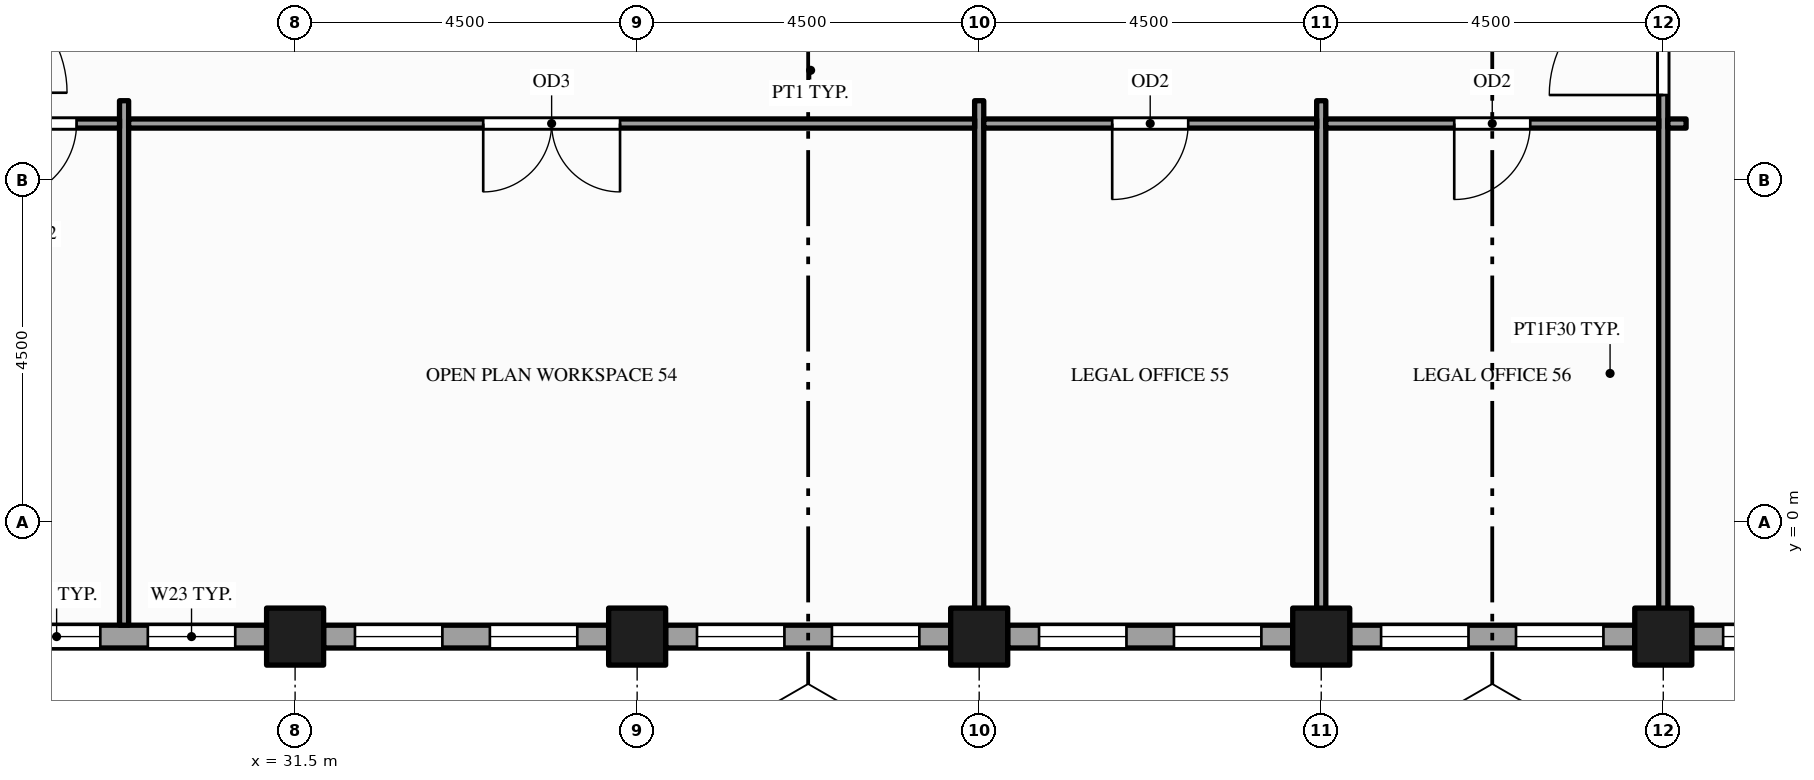
"""IFC4 building model, lengths in metres.
Left out: names, types, materials, properties, quantities, classifications, styles, units other than length and angle.
Written with IfcOpenShell. Run it as: python <this file> out.ifc"""

import sys

from ifc_helpers import new_model, si_unit, direction, frame, frame_2d, origin, origin_2d, place, context, subcontext, project, spatial, rectangle, hollow_rectangle, extrude, element, fill, save


model = new_model("IFC4")
c1 = context("Model", 3, precision=1e-05, world=origin(), true_north=direction((0.0, 1.0)))
c2 = subcontext(c1, "Body", "Model", "MODEL_VIEW")
j1 = project(units=[si_unit("LENGTHUNIT", "METRE"), si_unit("PLANEANGLEUNIT", "RADIAN")], contexts=[c1])
p1 = place(None, origin())
s1 = spatial("IfcSite", under=j1, at=p1, CompositionType="ELEMENT")
p2 = place(p1, origin())
s2 = spatial("IfcBuilding", under=s1, at=p2, CompositionType="ELEMENT")
p3 = place(p2, frame((0.0, 0.0, 235.0)))
s3 = spatial("IfcBuildingStorey", under=s2, at=p3, CompositionType="ELEMENT", Elevation=235.0)
for number, where, z_axis, x_axis in (
    (1, (31.5, -1.5, -0.15), (0.0, 0.0, 1.0), (1.0, 0.0, 0.0)),
    (2, (36.0, -1.5, -0.15), (0.0, 0.0, 1.0), (1.0, 0.0, 0.0)),
    (3, (40.5, -1.5, -0.15), (0.0, 0.0, 1.0), (1.0, 0.0, 0.0)),
    (4, (45.0, -1.5, -0.15), (0.0, 0.0, 1.0), (1.0, 0.0, 0.0)),
    (5, (49.5, -1.5, -0.15), (0.0, 0.0, 1.0), (1.0, 0.0, 0.0)),
):
    element("IfcColumn", number, at=place(p3, frame(where, z_axis=z_axis, x_axis=x_axis)), inside=s3, PredefinedType="COLUMN", context=c2, shape_type="SweptSolid", body=[
        extrude(hollow_rectangle(XDim=0.75, YDim=0.75, WallThickness=0.036, at=origin_2d()), origin(), (0.0, 0.0, 1.0), 4.0),
    ])
p4 = place(p3, frame((27.375, -1.5, 0.0), z_axis=(0.0, 0.0, 1.0), x_axis=(1.0, 0.0, 0.0)))
e6 = element("IfcWall", 6, at=p4, inside=s3, PredefinedType="STANDARD", context=c2, shape_type="SweptSolid", body=[
    extrude(rectangle(XDim=3.75, YDim=0.3, at=frame_2d((1.875, 0.0))), origin(), (0.0, 0.0, 1.0), 2.87),
])
p5 = place(p4, frame((0.413, 0.0, 0.9)))
e7 = element("IfcOpeningElement", 7, at=p5, cuts=e6, PredefinedType="OPENING", context=c2, shape_type="SweptSolid", body=[
    extrude(rectangle(XDim=1.15, YDim=1.75, at=frame_2d((0.575, 0.875))), frame((0.0, 0.16, 0.0), z_axis=(0.0, -1.0, 0.0), x_axis=(1.0, 0.0, 0.0)), (0.0, 0.0, 1.0), 0.32),
])
p6 = place(p4, frame((2.188, 0.0, 0.9)))
e8 = element("IfcOpeningElement", 8, at=p6, cuts=e6, PredefinedType="OPENING", context=c2, shape_type="SweptSolid", body=[
    extrude(rectangle(XDim=1.15, YDim=1.75, at=frame_2d((0.575, 0.875))), frame((0.0, 0.16, 0.0), z_axis=(0.0, -1.0, 0.0), x_axis=(1.0, 0.0, 0.0)), (0.0, 0.0, 1.0), 0.32),
])
p7 = place(p3, frame((31.875, -1.5, 0.0), z_axis=(0.0, 0.0, 1.0), x_axis=(1.0, 0.0, 0.0)))
e9 = element("IfcWall", 9, at=p7, inside=s3, PredefinedType="STANDARD", context=c2, shape_type="SweptSolid", body=[
    extrude(rectangle(XDim=3.75, YDim=0.3, at=frame_2d((1.875, 0.0))), origin(), (0.0, 0.0, 1.0), 2.87),
])
p8 = place(p7, frame((0.413, 0.0, 0.9)))
e10 = element("IfcOpeningElement", 10, at=p8, cuts=e9, PredefinedType="OPENING", context=c2, shape_type="SweptSolid", body=[
    extrude(rectangle(XDim=1.15, YDim=1.75, at=frame_2d((0.575, 0.875))), frame((0.0, 0.16, 0.0), z_axis=(0.0, -1.0, 0.0), x_axis=(1.0, 0.0, 0.0)), (0.0, 0.0, 1.0), 0.32),
])
p9 = place(p7, frame((2.188, 0.0, 0.9)))
e11 = element("IfcOpeningElement", 11, at=p9, cuts=e9, PredefinedType="OPENING", context=c2, shape_type="SweptSolid", body=[
    extrude(rectangle(XDim=1.15, YDim=1.75, at=frame_2d((0.575, 0.875))), frame((0.0, 0.16, 0.0), z_axis=(0.0, -1.0, 0.0), x_axis=(1.0, 0.0, 0.0)), (0.0, 0.0, 1.0), 0.32),
])
p10 = place(p3, frame((36.375, -1.5, 0.0), z_axis=(0.0, 0.0, 1.0), x_axis=(1.0, 0.0, 0.0)))
e12 = element("IfcWall", 12, at=p10, inside=s3, PredefinedType="STANDARD", context=c2, shape_type="SweptSolid", body=[
    extrude(rectangle(XDim=3.75, YDim=0.3, at=frame_2d((1.875, 0.0))), origin(), (0.0, 0.0, 1.0), 2.87),
])
p11 = place(p10, frame((0.413, 0.0, 0.9)))
e13 = element("IfcOpeningElement", 13, at=p11, cuts=e12, PredefinedType="OPENING", context=c2, shape_type="SweptSolid", body=[
    extrude(rectangle(XDim=1.15, YDim=1.75, at=frame_2d((0.575, 0.875))), frame((0.0, 0.16, 0.0), z_axis=(0.0, -1.0, 0.0), x_axis=(1.0, 0.0, 0.0)), (0.0, 0.0, 1.0), 0.32),
])
p12 = place(p10, frame((2.188, 0.0, 0.9)))
e14 = element("IfcOpeningElement", 14, at=p12, cuts=e12, PredefinedType="OPENING", context=c2, shape_type="SweptSolid", body=[
    extrude(rectangle(XDim=1.15, YDim=1.75, at=frame_2d((0.575, 0.875))), frame((0.0, 0.16, 0.0), z_axis=(0.0, -1.0, 0.0), x_axis=(1.0, 0.0, 0.0)), (0.0, 0.0, 1.0), 0.32),
])
p13 = place(p3, frame((40.875, -1.5, 0.0), z_axis=(0.0, 0.0, 1.0), x_axis=(1.0, 0.0, 0.0)))
e15 = element("IfcWall", 15, at=p13, inside=s3, PredefinedType="STANDARD", context=c2, shape_type="SweptSolid", body=[
    extrude(rectangle(XDim=3.75, YDim=0.3, at=frame_2d((1.875, 0.0))), origin(), (0.0, 0.0, 1.0), 2.87),
])
p14 = place(p13, frame((0.413, 0.0, 0.9)))
e16 = element("IfcOpeningElement", 16, at=p14, cuts=e15, PredefinedType="OPENING", context=c2, shape_type="SweptSolid", body=[
    extrude(rectangle(XDim=1.15, YDim=1.75, at=frame_2d((0.575, 0.875))), frame((0.0, 0.16, 0.0), z_axis=(0.0, -1.0, 0.0), x_axis=(1.0, 0.0, 0.0)), (0.0, 0.0, 1.0), 0.32),
])
p15 = place(p13, frame((2.188, 0.0, 0.9)))
e17 = element("IfcOpeningElement", 17, at=p15, cuts=e15, PredefinedType="OPENING", context=c2, shape_type="SweptSolid", body=[
    extrude(rectangle(XDim=1.15, YDim=1.75, at=frame_2d((0.575, 0.875))), frame((0.0, 0.16, 0.0), z_axis=(0.0, -1.0, 0.0), x_axis=(1.0, 0.0, 0.0)), (0.0, 0.0, 1.0), 0.32),
])
p16 = place(p3, frame((45.375, -1.5, 0.0), z_axis=(0.0, 0.0, 1.0), x_axis=(1.0, 0.0, 0.0)))
e18 = element("IfcWall", 18, at=p16, inside=s3, PredefinedType="STANDARD", context=c2, shape_type="SweptSolid", body=[
    extrude(rectangle(XDim=3.75, YDim=0.3, at=frame_2d((1.875, 0.0))), origin(), (0.0, 0.0, 1.0), 2.87),
])
p17 = place(p16, frame((0.413, 0.0, 0.9)))
e19 = element("IfcOpeningElement", 19, at=p17, cuts=e18, PredefinedType="OPENING", context=c2, shape_type="SweptSolid", body=[
    extrude(rectangle(XDim=1.15, YDim=1.75, at=frame_2d((0.575, 0.875))), frame((0.0, 0.16, 0.0), z_axis=(0.0, -1.0, 0.0), x_axis=(1.0, 0.0, 0.0)), (0.0, 0.0, 1.0), 0.32),
])
p18 = place(p16, frame((2.188, 0.0, 0.9)))
e20 = element("IfcOpeningElement", 20, at=p18, cuts=e18, PredefinedType="OPENING", context=c2, shape_type="SweptSolid", body=[
    extrude(rectangle(XDim=1.15, YDim=1.75, at=frame_2d((0.575, 0.875))), frame((0.0, 0.16, 0.0), z_axis=(0.0, -1.0, 0.0), x_axis=(1.0, 0.0, 0.0)), (0.0, 0.0, 1.0), 0.32),
])
p19 = place(p3, frame((49.875, -1.5, 0.0), z_axis=(0.0, 0.0, 1.0), x_axis=(1.0, 0.0, 0.0)))
e21 = element("IfcWall", 21, at=p19, inside=s3, PredefinedType="STANDARD", context=c2, shape_type="SweptSolid", body=[
    extrude(rectangle(XDim=3.75, YDim=0.3, at=frame_2d((1.875, 0.0))), origin(), (0.0, 0.0, 1.0), 2.87),
])
p20 = place(p19, frame((0.413, 0.0, 0.9)))
e22 = element("IfcOpeningElement", 22, at=p20, cuts=e21, PredefinedType="OPENING", context=c2, shape_type="SweptSolid", body=[
    extrude(rectangle(XDim=1.15, YDim=1.75, at=frame_2d((0.575, 0.875))), frame((0.0, 0.16, 0.0), z_axis=(0.0, -1.0, 0.0), x_axis=(1.0, 0.0, 0.0)), (0.0, 0.0, 1.0), 0.32),
])
p21 = place(p19, frame((2.188, 0.0, 0.9)))
e23 = element("IfcOpeningElement", 23, at=p21, cuts=e21, PredefinedType="OPENING", context=c2, shape_type="SweptSolid", body=[
    extrude(rectangle(XDim=1.15, YDim=1.75, at=frame_2d((0.575, 0.875))), frame((0.0, 0.16, 0.0), z_axis=(0.0, -1.0, 0.0), x_axis=(1.0, 0.0, 0.0)), (0.0, 0.0, 1.0), 0.32),
])
for number, where, z_axis, x_axis in (
    (24, (29.25, -1.35, 0.0), (0.0, 0.0, 1.0), (0.0, 1.0, 0.0)),
    (25, (40.5, -1.35, 0.0), (0.0, 0.0, 1.0), (0.0, 1.0, 0.0)),
    (26, (45.0, -1.35, 0.0), (0.0, 0.0, 1.0), (0.0, 1.0, 0.0)),
):
    element("IfcWall", number, at=place(p3, frame(where, z_axis=z_axis, x_axis=x_axis)), inside=s3, PredefinedType="PARTITIONING", context=c2, shape_type="SweptSolid", body=[
        extrude(rectangle(XDim=6.9, YDim=0.12, at=frame_2d((3.45, 0.0))), origin(), (0.0, 0.0, 1.0), 2.87),
    ])
p22 = place(p3, frame((49.5, -1.35, 0.0), z_axis=(0.0, 0.0, 1.0), x_axis=(0.0, 1.0, 0.0)))
e27 = element("IfcWall", 27, at=p22, inside=s3, PredefinedType="PARTITIONING", context=c2, shape_type="SweptSolid", body=[
    extrude(rectangle(XDim=22.2, YDim=0.12, at=frame_2d((11.1, 0.0))), origin(), (0.0, 0.0, 1.0), 2.87),
])
p23 = place(p22, frame((6.975, 0.0, 0.0)))
e28 = element("IfcOpeningElement", 28, at=p23, cuts=e27, PredefinedType="OPENING", context=c2, shape_type="SweptSolid", body=[
    extrude(rectangle(XDim=1.5, YDim=2.1, at=frame_2d((0.75, 1.05))), frame((0.0, 0.07, 0.0), z_axis=(0.0, -1.0, 0.0), x_axis=(1.0, 0.0, 0.0)), (0.0, 0.0, 1.0), 0.14),
])
p24 = place(p22, frame((13.725, 0.0, 0.0)))
e29 = element("IfcOpeningElement", 29, at=p24, cuts=e27, PredefinedType="OPENING", context=c2, shape_type="SweptSolid", body=[
    extrude(rectangle(XDim=1.5, YDim=2.1, at=frame_2d((0.75, 1.05))), frame((0.0, 0.07, 0.0), z_axis=(0.0, -1.0, 0.0), x_axis=(1.0, 0.0, 0.0)), (0.0, 0.0, 1.0), 0.14),
])
p25 = place(p22, frame((9.29, 0.0, 0.0)))
e30 = element("IfcOpeningElement", 30, at=p25, cuts=e27, PredefinedType="OPENING", context=c2, shape_type="SweptSolid", body=[
    extrude(rectangle(XDim=0.9, YDim=2.1, at=frame_2d((0.45, 1.05))), frame((0.0, 0.07, 0.0), z_axis=(0.0, -1.0, 0.0), x_axis=(1.0, 0.0, 0.0)), (0.0, 0.0, 1.0), 0.14),
])
p26 = place(p22, frame((10.65, 0.0, 0.0)))
e31 = element("IfcOpeningElement", 31, at=p26, cuts=e27, PredefinedType="OPENING", context=c2, shape_type="SweptSolid", body=[
    extrude(rectangle(XDim=0.9, YDim=2.1, at=frame_2d((0.45, 1.05))), frame((0.0, 0.07, 0.0), z_axis=(0.0, -1.0, 0.0), x_axis=(1.0, 0.0, 0.0)), (0.0, 0.0, 1.0), 0.14),
])
p27 = place(p22, frame((12.01, 0.0, 0.0)))
e32 = element("IfcOpeningElement", 32, at=p27, cuts=e27, PredefinedType="OPENING", context=c2, shape_type="SweptSolid", body=[
    extrude(rectangle(XDim=1.0, YDim=2.1, at=frame_2d((0.5, 1.05))), frame((0.0, 0.07, 0.0), z_axis=(0.0, -1.0, 0.0), x_axis=(1.0, 0.0, 0.0)), (0.0, 0.0, 1.0), 0.14),
])
p28 = place(p3, frame((27.06, 5.25, 0.0), z_axis=(0.0, 0.0, 1.0), x_axis=(1.0, 0.0, 0.0)))
e33 = element("IfcWall", 33, at=p28, inside=s3, PredefinedType="PARTITIONING", context=c2, shape_type="SweptSolid", body=[
    extrude(rectangle(XDim=2.13, YDim=0.12, at=frame_2d((1.065, 0.0))), origin(), (0.0, 0.0, 1.0), 2.87),
])
p29 = place(p28, frame((0.565, 0.0, 0.0)))
e34 = element("IfcOpeningElement", 34, at=p29, cuts=e33, PredefinedType="OPENING", context=c2, shape_type="SweptSolid", body=[
    extrude(rectangle(XDim=1.0, YDim=2.1, at=frame_2d((0.5, 1.05))), frame((0.0, 0.07, 0.0), z_axis=(0.0, -1.0, 0.0), x_axis=(1.0, 0.0, 0.0)), (0.0, 0.0, 1.0), 0.14),
])
p30 = place(p3, frame((29.31, 5.25, 0.0), z_axis=(0.0, 0.0, 1.0), x_axis=(1.0, 0.0, 0.0)))
e35 = element("IfcWall", 35, at=p30, inside=s3, PredefinedType="PARTITIONING", context=c2, shape_type="SweptSolid", body=[
    extrude(rectangle(XDim=11.13, YDim=0.12, at=frame_2d((5.565, 0.0))), origin(), (0.0, 0.0, 1.0), 2.87),
])
p31 = place(p30, frame((4.665, 0.0, 0.0)))
e36 = element("IfcOpeningElement", 36, at=p31, cuts=e35, PredefinedType="OPENING", context=c2, shape_type="SweptSolid", body=[
    extrude(rectangle(XDim=1.8, YDim=2.1, at=frame_2d((0.9, 1.05))), frame((0.0, 0.07, 0.0), z_axis=(0.0, -1.0, 0.0), x_axis=(1.0, 0.0, 0.0)), (0.0, 0.0, 1.0), 0.14),
])
p32 = place(p3, frame((40.56, 5.25, 0.0), z_axis=(0.0, 0.0, 1.0), x_axis=(1.0, 0.0, 0.0)))
e37 = element("IfcWall", 37, at=p32, inside=s3, PredefinedType="PARTITIONING", context=c2, shape_type="SweptSolid", body=[
    extrude(rectangle(XDim=4.38, YDim=0.12, at=frame_2d((2.19, 0.0))), origin(), (0.0, 0.0, 1.0), 2.87),
])
p33 = place(p32, frame((1.69, 0.0, 0.0)))
e38 = element("IfcOpeningElement", 38, at=p33, cuts=e37, PredefinedType="OPENING", context=c2, shape_type="SweptSolid", body=[
    extrude(rectangle(XDim=1.0, YDim=2.1, at=frame_2d((0.5, 1.05))), frame((0.0, 0.07, 0.0), z_axis=(0.0, -1.0, 0.0), x_axis=(1.0, 0.0, 0.0)), (0.0, 0.0, 1.0), 0.14),
])
p34 = place(p3, frame((45.06, 5.25, 0.0), z_axis=(0.0, 0.0, 1.0), x_axis=(1.0, 0.0, 0.0)))
e39 = element("IfcWall", 39, at=p34, inside=s3, PredefinedType="PARTITIONING", context=c2, shape_type="SweptSolid", body=[
    extrude(rectangle(XDim=4.38, YDim=0.12, at=frame_2d((2.19, 0.0))), origin(), (0.0, 0.0, 1.0), 2.87),
])
p35 = place(p34, frame((1.69, 0.0, 0.0)))
e40 = element("IfcOpeningElement", 40, at=p35, cuts=e39, PredefinedType="OPENING", context=c2, shape_type="SweptSolid", body=[
    extrude(rectangle(XDim=1.0, YDim=2.1, at=frame_2d((0.5, 1.05))), frame((0.0, 0.07, 0.0), z_axis=(0.0, -1.0, 0.0), x_axis=(1.0, 0.0, 0.0)), (0.0, 0.0, 1.0), 0.14),
])
p36 = place(p3, frame((49.56, 5.25, 0.0), z_axis=(0.0, 0.0, 1.0), x_axis=(1.0, 0.0, 0.0)))
e41 = element("IfcWall", 41, at=p36, inside=s3, PredefinedType="PARTITIONING", context=c2, shape_type="SweptSolid", body=[
    extrude(rectangle(XDim=0.24, YDim=0.12, at=frame_2d((0.12, 0.0))), origin(), (0.0, 0.0, 1.0), 2.87),
])
p37 = place(p5, origin())
e42 = element("IfcWindow", 42, at=p37, inside=s3, PartitioningType="SINGLE_PANEL", PredefinedType="WINDOW", context=c2, shape_type="SweptSolid", body=[
    extrude(rectangle(XDim=1.15, YDim=1.75, at=frame_2d((0.575, 0.875))), frame((0.0, 0.03, 0.0), z_axis=(0.0, -1.0, 0.0), x_axis=(1.0, 0.0, 0.0)), (0.0, 0.0, 1.0), 0.06),
])
fill(e7, e42)
p38 = place(p6, origin())
e43 = element("IfcWindow", 43, at=p38, inside=s3, PartitioningType="SINGLE_PANEL", PredefinedType="WINDOW", context=c2, shape_type="SweptSolid", body=[
    extrude(rectangle(XDim=1.15, YDim=1.75, at=frame_2d((0.575, 0.875))), frame((0.0, 0.03, 0.0), z_axis=(0.0, -1.0, 0.0), x_axis=(1.0, 0.0, 0.0)), (0.0, 0.0, 1.0), 0.06),
])
fill(e8, e43)
p39 = place(p8, origin())
e44 = element("IfcWindow", 44, at=p39, inside=s3, PartitioningType="SINGLE_PANEL", PredefinedType="WINDOW", context=c2, shape_type="SweptSolid", body=[
    extrude(rectangle(XDim=1.15, YDim=1.75, at=frame_2d((0.575, 0.875))), frame((0.0, 0.03, 0.0), z_axis=(0.0, -1.0, 0.0), x_axis=(1.0, 0.0, 0.0)), (0.0, 0.0, 1.0), 0.06),
])
fill(e10, e44)
p40 = place(p9, origin())
e45 = element("IfcWindow", 45, at=p40, inside=s3, PartitioningType="SINGLE_PANEL", PredefinedType="WINDOW", context=c2, shape_type="SweptSolid", body=[
    extrude(rectangle(XDim=1.15, YDim=1.75, at=frame_2d((0.575, 0.875))), frame((0.0, 0.03, 0.0), z_axis=(0.0, -1.0, 0.0), x_axis=(1.0, 0.0, 0.0)), (0.0, 0.0, 1.0), 0.06),
])
fill(e11, e45)
p41 = place(p11, origin())
e46 = element("IfcWindow", 46, at=p41, inside=s3, PartitioningType="SINGLE_PANEL", PredefinedType="WINDOW", context=c2, shape_type="SweptSolid", body=[
    extrude(rectangle(XDim=1.15, YDim=1.75, at=frame_2d((0.575, 0.875))), frame((0.0, 0.03, 0.0), z_axis=(0.0, -1.0, 0.0), x_axis=(1.0, 0.0, 0.0)), (0.0, 0.0, 1.0), 0.06),
])
fill(e13, e46)
p42 = place(p12, origin())
e47 = element("IfcWindow", 47, at=p42, inside=s3, PartitioningType="SINGLE_PANEL", PredefinedType="WINDOW", context=c2, shape_type="SweptSolid", body=[
    extrude(rectangle(XDim=1.15, YDim=1.75, at=frame_2d((0.575, 0.875))), frame((0.0, 0.03, 0.0), z_axis=(0.0, -1.0, 0.0), x_axis=(1.0, 0.0, 0.0)), (0.0, 0.0, 1.0), 0.06),
])
fill(e14, e47)
p43 = place(p14, origin())
e48 = element("IfcWindow", 48, at=p43, inside=s3, PartitioningType="SINGLE_PANEL", PredefinedType="WINDOW", context=c2, shape_type="SweptSolid", body=[
    extrude(rectangle(XDim=1.15, YDim=1.75, at=frame_2d((0.575, 0.875))), frame((0.0, 0.03, 0.0), z_axis=(0.0, -1.0, 0.0), x_axis=(1.0, 0.0, 0.0)), (0.0, 0.0, 1.0), 0.06),
])
fill(e16, e48)
p44 = place(p15, origin())
e49 = element("IfcWindow", 49, at=p44, inside=s3, PartitioningType="SINGLE_PANEL", PredefinedType="WINDOW", context=c2, shape_type="SweptSolid", body=[
    extrude(rectangle(XDim=1.15, YDim=1.75, at=frame_2d((0.575, 0.875))), frame((0.0, 0.03, 0.0), z_axis=(0.0, -1.0, 0.0), x_axis=(1.0, 0.0, 0.0)), (0.0, 0.0, 1.0), 0.06),
])
fill(e17, e49)
p45 = place(p17, origin())
e50 = element("IfcWindow", 50, at=p45, inside=s3, PartitioningType="SINGLE_PANEL", PredefinedType="WINDOW", context=c2, shape_type="SweptSolid", body=[
    extrude(rectangle(XDim=1.15, YDim=1.75, at=frame_2d((0.575, 0.875))), frame((0.0, 0.03, 0.0), z_axis=(0.0, -1.0, 0.0), x_axis=(1.0, 0.0, 0.0)), (0.0, 0.0, 1.0), 0.06),
])
fill(e19, e50)
p46 = place(p18, origin())
e51 = element("IfcWindow", 51, at=p46, inside=s3, PartitioningType="SINGLE_PANEL", PredefinedType="WINDOW", context=c2, shape_type="SweptSolid", body=[
    extrude(rectangle(XDim=1.15, YDim=1.75, at=frame_2d((0.575, 0.875))), frame((0.0, 0.03, 0.0), z_axis=(0.0, -1.0, 0.0), x_axis=(1.0, 0.0, 0.0)), (0.0, 0.0, 1.0), 0.06),
])
fill(e20, e51)
p47 = place(p20, origin())
e52 = element("IfcWindow", 52, at=p47, inside=s3, PartitioningType="SINGLE_PANEL", PredefinedType="WINDOW", context=c2, shape_type="SweptSolid", body=[
    extrude(rectangle(XDim=1.15, YDim=1.75, at=frame_2d((0.575, 0.875))), frame((0.0, 0.03, 0.0), z_axis=(0.0, -1.0, 0.0), x_axis=(1.0, 0.0, 0.0)), (0.0, 0.0, 1.0), 0.06),
])
fill(e22, e52)
p48 = place(p23, origin())
e53 = element("IfcDoor", 53, at=p48, inside=s3, OperationType="SINGLE_SWING_LEFT", PredefinedType="DOOR", context=c2, shape_type="SweptSolid", body=[
    extrude(rectangle(XDim=1.5, YDim=2.1, at=frame_2d((0.75, 1.05))), frame((0.0, 0.025, 0.0), z_axis=(0.0, -1.0, 0.0), x_axis=(1.0, 0.0, 0.0)), (0.0, 0.0, 1.0), 0.05),
])
fill(e28, e53)
p49 = place(p29, origin())
e54 = element("IfcDoor", 54, at=p49, inside=s3, OperationType="SINGLE_SWING_LEFT", PredefinedType="DOOR", context=c2, shape_type="SweptSolid", body=[
    extrude(rectangle(XDim=1.0, YDim=2.1, at=frame_2d((0.5, 1.05))), frame((0.0, 0.025, 0.0), z_axis=(0.0, -1.0, 0.0), x_axis=(1.0, 0.0, 0.0)), (0.0, 0.0, 1.0), 0.05),
])
fill(e34, e54)
p50 = place(p31, origin())
e55 = element("IfcDoor", 55, at=p50, inside=s3, OperationType="DOUBLE_DOOR_SINGLE_SWING", PredefinedType="DOOR", context=c2, shape_type="SweptSolid", body=[
    extrude(rectangle(XDim=1.8, YDim=2.1, at=frame_2d((0.9, 1.05))), frame((0.0, 0.025, 0.0), z_axis=(0.0, -1.0, 0.0), x_axis=(1.0, 0.0, 0.0)), (0.0, 0.0, 1.0), 0.05),
])
fill(e36, e55)
p51 = place(p33, origin())
e56 = element("IfcDoor", 56, at=p51, inside=s3, OperationType="SINGLE_SWING_LEFT", PredefinedType="DOOR", context=c2, shape_type="SweptSolid", body=[
    extrude(rectangle(XDim=1.0, YDim=2.1, at=frame_2d((0.5, 1.05))), frame((0.0, 0.025, 0.0), z_axis=(0.0, -1.0, 0.0), x_axis=(1.0, 0.0, 0.0)), (0.0, 0.0, 1.0), 0.05),
])
fill(e38, e56)
p52 = place(p35, origin())
e57 = element("IfcDoor", 57, at=p52, inside=s3, OperationType="SINGLE_SWING_LEFT", PredefinedType="DOOR", context=c2, shape_type="SweptSolid", body=[
    extrude(rectangle(XDim=1.0, YDim=2.1, at=frame_2d((0.5, 1.05))), frame((0.0, 0.025, 0.0), z_axis=(0.0, -1.0, 0.0), x_axis=(1.0, 0.0, 0.0)), (0.0, 0.0, 1.0), 0.05),
])
fill(e40, e57)
save(model, sys.argv[1])
